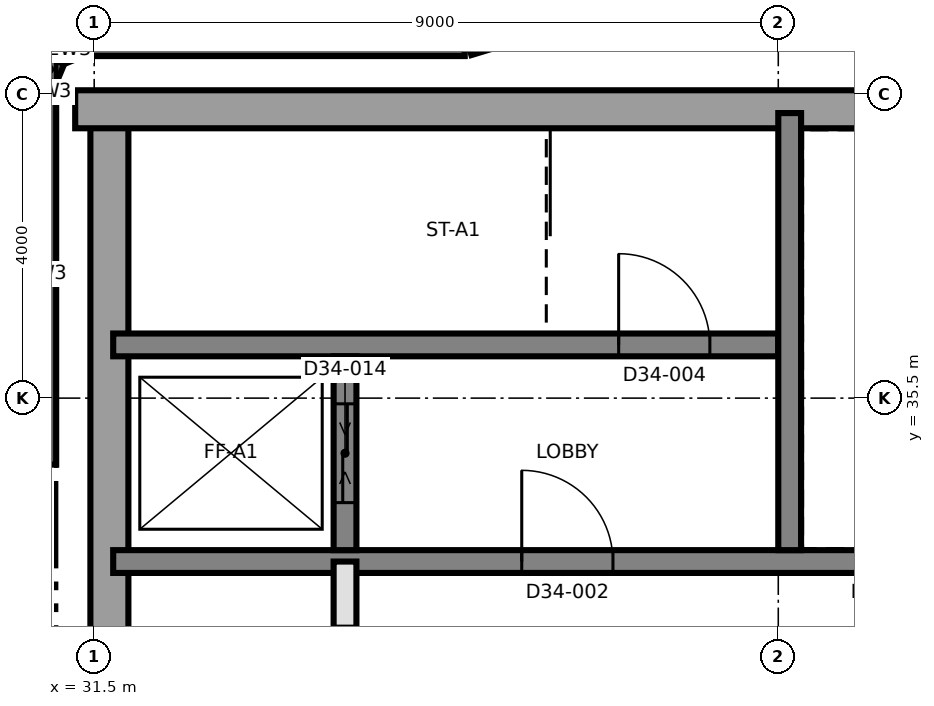
"""IFC4 building model, lengths in metres.
Left out: names, types, materials, properties, quantities, classifications, styles, units other than length and angle.
Written with IfcOpenShell. Run it as: python <this file> out.ifc"""

import sys

from ifc_helpers import new_model, si_unit, direction, frame, frame_2d, origin, place, context, subcontext, project, spatial, polyline, rectangle, outline, extrude, element, fill, save


model = new_model("IFC4")
c1 = context("Model", 3, precision=1e-05, world=origin(), true_north=direction((0.0, 1.0)))
c2 = subcontext(c1, "Body", "Model", "MODEL_VIEW")
j1 = project(units=[si_unit("LENGTHUNIT", "METRE"), si_unit("PLANEANGLEUNIT", "RADIAN")], contexts=[c1])
p1 = place(None, origin())
s1 = spatial("IfcSite", under=j1, at=p1, CompositionType="ELEMENT")
p2 = place(p1, origin())
s2 = spatial("IfcBuilding", under=s1, at=p2, CompositionType="ELEMENT")
p3 = place(p2, frame((0.0, 0.0, 281.3)))
s3 = spatial("IfcBuildingStorey", under=s2, at=p3, CompositionType="ELEMENT", Elevation=281.3)
p4 = place(p3, frame((31.7, 21.75, 0.0), z_axis=(0.0, 0.0, 1.0), x_axis=(0.0, 1.0, 0.0)))
e1 = element("IfcWall", 1, at=p4, inside=s3, PredefinedType="SHEAR", context=c2, shape_type="SweptSolid", body=[
    extrude(outline(polyline([(0.0, 0.0), (17.5, 0.0), (17.5, 2.46), (14.941, 4.2), (0.0, 4.2), (0.0, 0.0)])), frame((0.0, 0.25, 0.0), z_axis=(0.0, -1.0, 0.0), x_axis=(1.0, 0.0, 0.0)), (0.0, 0.0, 1.0), 0.5),
])
p5 = place(p3, frame((31.25, 39.3, 0.0), z_axis=(0.0, 0.0, 1.0), x_axis=(1.0, 0.0, 0.0)))
e2 = element("IfcWall", 2, at=p5, inside=s3, PredefinedType="SHEAR", context=c2, shape_type="SweptSolid", body=[
    extrude(rectangle(XDim=27.0, YDim=0.5, at=frame_2d((13.5, 0.0))), origin(), (0.0, 0.0, 1.0), 2.426),
])
p6 = place(p3, frame((31.75, 33.35, 0.0), z_axis=(0.0, 0.0, 1.0), x_axis=(1.0, 0.0, 0.0)))
e3 = element("IfcWall", 3, at=p6, inside=s3, PredefinedType="SHEAR", context=c2, shape_type="SweptSolid", body=[
    extrude(rectangle(XDim=26.5, YDim=0.3, at=frame_2d((13.25, 0.0))), origin(), (0.0, 0.0, 1.0), 4.2),
])
p7 = place(p6, frame((13.9, 0.0, 0.0)))
e4 = element("IfcOpeningElement", 4, at=p7, cuts=e3, PredefinedType="OPENING", context=c2, shape_type="SweptSolid", body=[
    extrude(rectangle(XDim=1.4, YDim=2.1, at=frame_2d((0.7, 1.05))), frame((0.0, 0.16, 0.0), z_axis=(0.0, -1.0, 0.0), x_axis=(1.0, 0.0, 0.0)), (0.0, 0.0, 1.0), 0.32),
])
p8 = place(p6, frame((5.375, 0.0, 0.0)))
e5 = element("IfcOpeningElement", 5, at=p8, cuts=e3, PredefinedType="OPENING", context=c2, shape_type="SweptSolid", body=[
    extrude(rectangle(XDim=1.2, YDim=2.1, at=frame_2d((0.6, 1.05))), frame((0.0, 0.16, 0.0), z_axis=(0.0, -1.0, 0.0), x_axis=(1.0, 0.0, 0.0)), (0.0, 0.0, 1.0), 0.32),
])
p9 = place(p6, frame((19.925, 0.0, 0.0)))
e6 = element("IfcOpeningElement", 6, at=p9, cuts=e3, PredefinedType="OPENING", context=c2, shape_type="SweptSolid", body=[
    extrude(rectangle(XDim=1.2, YDim=2.1, at=frame_2d((0.6, 1.05))), frame((0.0, 0.16, 0.0), z_axis=(0.0, -1.0, 0.0), x_axis=(1.0, 0.0, 0.0)), (0.0, 0.0, 1.0), 0.32),
])
p10 = place(p6, frame((9.8, 0.0, 0.0)))
e7 = element("IfcOpeningElement", 7, at=p10, cuts=e3, PredefinedType="OPENING", context=c2, shape_type="SweptSolid", body=[
    extrude(rectangle(XDim=0.9, YDim=2.1, at=frame_2d((0.45, 1.05))), frame((0.0, 0.16, 0.0), z_axis=(0.0, -1.0, 0.0), x_axis=(1.0, 0.0, 0.0)), (0.0, 0.0, 1.0), 0.32),
])
p11 = place(p3, frame((31.75, 36.2, 0.0), z_axis=(0.0, 0.0, 1.0), x_axis=(1.0, 0.0, 0.0)))
e8 = element("IfcWall", 8, at=p11, inside=s3, PredefinedType="SHEAR", context=c2, shape_type="SweptSolid", body=[
    extrude(rectangle(XDim=8.75, YDim=0.3, at=frame_2d((4.375, 0.0))), origin(), (0.0, 0.0, 1.0), 4.2),
])
p12 = place(p11, frame((6.65, 0.0, 0.0)))
e9 = element("IfcOpeningElement", 9, at=p12, cuts=e8, PredefinedType="OPENING", context=c2, shape_type="SweptSolid", body=[
    extrude(rectangle(XDim=1.2, YDim=2.1, at=frame_2d((0.6, 1.05))), frame((0.0, 0.16, 0.0), z_axis=(0.0, -1.0, 0.0), x_axis=(1.0, 0.0, 0.0)), (0.0, 0.0, 1.0), 0.32),
])
p13 = place(p3, frame((40.65, 33.5, 0.0), z_axis=(0.0, 0.0, 1.0), x_axis=(0.0, 1.0, 0.0)))
e10 = element("IfcWall", 10, at=p13, inside=s3, PredefinedType="SHEAR", context=c2, shape_type="SweptSolid", body=[
    extrude(outline(polyline([(0.0, 0.0), (5.75, 0.0), (5.75, 2.46), (3.191, 4.2), (0.0, 4.2), (0.0, 0.0)])), frame((0.0, 0.15, 0.0), z_axis=(0.0, -1.0, 0.0), x_axis=(1.0, 0.0, 0.0)), (0.0, 0.0, 1.0), 0.3),
])
p14 = place(p3, frame((34.8, 33.5, 0.0), z_axis=(0.0, 0.0, 1.0), x_axis=(0.0, 1.0, 0.0)))
e11 = element("IfcWall", 11, at=p14, inside=s3, PredefinedType="SHEAR", context=c2, shape_type="SweptSolid", body=[
    extrude(rectangle(XDim=2.55, YDim=0.3, at=frame_2d((1.275, 0.0))), origin(), (0.0, 0.0, 1.0), 4.2),
])
p15 = place(p14, frame((0.625, 0.0, 0.0)))
e12 = element("IfcOpeningElement", 12, at=p15, cuts=e11, PredefinedType="OPENING", context=c2, shape_type="SweptSolid", body=[
    extrude(rectangle(XDim=1.3, YDim=2.4, at=frame_2d((0.65, 1.2))), frame((0.0, 0.16, 0.0), z_axis=(0.0, -1.0, 0.0), x_axis=(1.0, 0.0, 0.0)), (0.0, 0.0, 1.0), 0.32),
])
p16 = place(p3, frame((38.064, 40.656, 0.0), z_axis=(0.0, 0.0, 1.0), x_axis=(-0.956946775749, -0.290263446515, 0.0)))
e13 = element("IfcWall", 13, at=p16, inside=s3, PredefinedType="SOLIDWALL", context=c2, shape_type="SweptSolid", body=[
    extrude(outline(polyline([(0.0, 0.0), (1.72, 0.0), (1.72, 2.793), (0.0, 2.454), (0.0, 0.0)])), frame((0.0, 0.15, 0.0), z_axis=(0.0, -1.0, 0.0), x_axis=(1.0, 0.0, 0.0)), (0.0, 0.0, 1.0), 0.3),
])
p17 = place(p3, frame((36.375, 40.15, 0.0), z_axis=(0.0, 0.0, 1.0), x_axis=(-1.0, 0.0, 0.0)))
e14 = element("IfcWall", 14, at=p17, inside=s3, PredefinedType="SOLIDWALL", context=c2, shape_type="SweptSolid", body=[
    extrude(outline(polyline([(0.0, 0.0), (5.015, 0.0), (5.015, 2.798), (5.015, 0.0), (3.344, 2.798), (1.672, 2.798), (0.0, 2.798), (0.0, 0.0)])), frame((0.0, 0.15, 0.0), z_axis=(0.0, -1.0, 0.0), x_axis=(1.0, 0.0, 0.0)), (0.0, 0.0, 1.0), 0.3),
])
p18 = place(p3, frame((31.302, 40.139, 0.0), z_axis=(0.0, 0.0, 1.0), x_axis=(-0.923757413239, -0.38297812142, 0.0)))
e15 = element("IfcWall", 15, at=p18, inside=s3, PredefinedType="SOLIDWALL", context=c2, shape_type="SweptSolid", body=[
    extrude(outline(polyline([(0.0, 0.0), (0.275, 0.0), (0.275, 2.877), (0.0, 2.806), (0.0, 0.0)])), frame((0.0, 0.15, 0.0), z_axis=(0.0, -1.0, 0.0), x_axis=(1.0, 0.0, 0.0)), (0.0, 0.0, 1.0), 0.3),
])
p19 = place(p3, frame((30.967, 39.952, 0.0), z_axis=(0.0, 0.0, 1.0), x_axis=(-0.38297812142, -0.923757413239, 0.0)))
e16 = element("IfcWall", 16, at=p19, inside=s3, PredefinedType="SOLIDWALL", context=c2, shape_type="SweptSolid", body=[
    extrude(outline(polyline([(0.0, 0.0), (0.275, 0.0), (0.275, 3.105), (0.0, 2.933), (0.0, 0.0)])), frame((0.0, 0.15, 0.0), z_axis=(0.0, -1.0, 0.0), x_axis=(1.0, 0.0, 0.0)), (0.0, 0.0, 1.0), 0.3),
])
p20 = place(p3, frame((30.85, 39.64, 0.0), z_axis=(0.0, 0.0, 1.0), x_axis=(0.0, -1.0, 0.0)))
e17 = element("IfcWall", 17, at=p20, inside=s3, PredefinedType="SOLIDWALL", context=c2, shape_type="SweptSolid", body=[
    extrude(outline(polyline([(0.0, 0.0), (5.015, 0.0), (5.015, 3.9), (5.015, 0.0), (3.344, 3.9), (1.672, 3.9), (0.0, 3.145), (0.0, 0.0)])), frame((0.0, 0.15, 0.0), z_axis=(0.0, -1.0, 0.0), x_axis=(1.0, 0.0, 0.0)), (0.0, 0.0, 1.0), 0.3),
])
p21 = place(p3, frame((34.8, 30.65, 0.0), z_axis=(0.0, 0.0, 1.0), x_axis=(0.0, 1.0, 0.0)))
e18 = element("IfcWall", 18, at=p21, inside=s3, PredefinedType="SOLIDWALL", context=c2, shape_type="SweptSolid", body=[
    extrude(rectangle(XDim=2.7, YDim=0.3, at=frame_2d((1.35, 0.0))), origin(), (0.0, 0.0, 1.0), 3.9),
])
p22 = place(p21, frame((0.85, 0.0, 0.0)))
e19 = element("IfcOpeningElement", 19, at=p22, cuts=e18, PredefinedType="OPENING", context=c2, shape_type="SweptSolid", body=[
    extrude(rectangle(XDim=1.0, YDim=2.1, at=frame_2d((0.5, 1.05))), frame((0.0, 0.16, 0.0), z_axis=(0.0, -1.0, 0.0), x_axis=(1.0, 0.0, 0.0)), (0.0, 0.0, 1.0), 0.32),
])
p23 = place(p8, origin())
e20 = element("IfcDoor", 20, at=p23, inside=s3, OperationType="SINGLE_SWING_LEFT", PredefinedType="DOOR", context=c2, shape_type="SweptSolid", body=[
    extrude(rectangle(XDim=1.2, YDim=2.1, at=frame_2d((0.6, 1.05))), frame((0.0, 0.025, 0.0), z_axis=(0.0, -1.0, 0.0), x_axis=(1.0, 0.0, 0.0)), (0.0, 0.0, 1.0), 0.05),
])
fill(e5, e20)
p24 = place(p12, origin())
e21 = element("IfcDoor", 21, at=p24, inside=s3, OperationType="SINGLE_SWING_RIGHT", PredefinedType="DOOR", context=c2, shape_type="SweptSolid", body=[
    extrude(rectangle(XDim=1.2, YDim=2.1, at=frame_2d((0.6, 1.05))), frame((0.0, 0.025, 0.0), z_axis=(0.0, -1.0, 0.0), x_axis=(1.0, 0.0, 0.0)), (0.0, 0.0, 1.0), 0.05),
])
fill(e9, e21)
p25 = place(p15, origin())
e22 = element("IfcDoor", 22, at=p25, inside=s3, OperationType="SLIDING_TO_LEFT", PredefinedType="DOOR", context=c2, shape_type="SweptSolid", body=[
    extrude(rectangle(XDim=1.3, YDim=2.4, at=frame_2d((0.65, 1.2))), frame((0.0, 0.025, 0.0), z_axis=(0.0, -1.0, 0.0), x_axis=(1.0, 0.0, 0.0)), (0.0, 0.0, 1.0), 0.05),
])
fill(e12, e22)
save(model, sys.argv[1])
